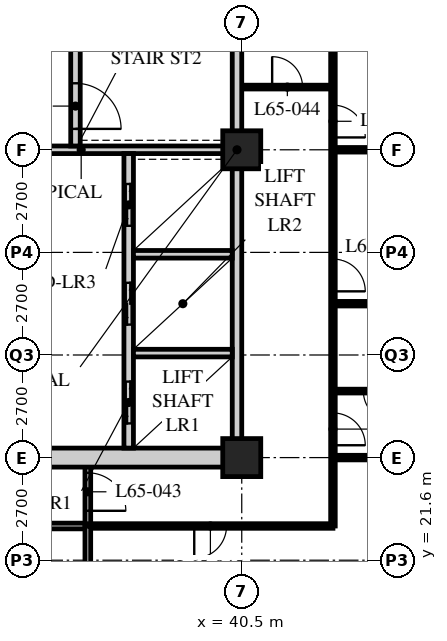
"""IFC4 building model, lengths in metres.
Left out: names, types, materials, properties, quantities, classifications, styles, units other than length and angle.
Written with IfcOpenShell. Run it as: python <this file> out.ifc"""

import sys

from ifc_helpers import new_model, si_unit, direction, frame, frame_2d, origin, origin_2d, place, context, subcontext, project, spatial, rectangle, hollow_rectangle, extrude, element, fill, save


model = new_model("IFC4")
c1 = context("Model", 3, precision=1e-05, world=origin(), true_north=direction((0.0, 1.0)))
c2 = subcontext(c1, "Body", "Model", "MODEL_VIEW")
j1 = project(units=[si_unit("LENGTHUNIT", "METRE"), si_unit("PLANEANGLEUNIT", "RADIAN")], contexts=[c1])
p1 = place(None, origin())
s1 = spatial("IfcSite", under=j1, at=p1, CompositionType="ELEMENT")
p2 = place(p1, origin())
s2 = spatial("IfcBuilding", under=s1, at=p2, CompositionType="ELEMENT")
p3 = place(p2, frame((0.0, 0.0, 254.1)))
s3 = spatial("IfcBuildingStorey", under=s2, at=p3, CompositionType="ELEMENT", Elevation=254.1)
for number, where, z_axis, x_axis in (
    (1, (40.5, 24.3, 0.0), (0.0, 0.0, 1.0), (1.0, 0.0, 0.0)),
    (2, (40.5, 32.4, 0.0), (0.0, 0.0, 1.0), (1.0, 0.0, 0.0)),
):
    element("IfcColumn", number, at=place(p3, frame(where, z_axis=z_axis, x_axis=x_axis)), inside=s3, PredefinedType="COLUMN", context=c2, shape_type="SweptSolid", body=[
        extrude(hollow_rectangle(XDim=1.0, YDim=1.0, WallThickness=0.1, at=origin_2d()), origin(), (0.0, 0.0, 1.0), 3.9),
    ])
p4 = place(p3, frame((12.15, 22.5, 0.0), z_axis=(0.0, 0.0, 1.0), x_axis=(1.0, 0.0, 0.0)))
e3 = element("IfcWall", 3, at=p4, inside=s3, PredefinedType="PARTITIONING", context=c2, shape_type="SweptSolid", body=[
    extrude(rectangle(XDim=24.3, YDim=0.15, at=frame_2d((12.15, 0.0))), origin(), (0.0, 0.0, 1.0), 3.69),
])
p5 = place(p4, frame((6.4, 0.0, 0.0)))
e4 = element("IfcOpeningElement", 4, at=p5, cuts=e3, PredefinedType="OPENING", context=c2, shape_type="SweptSolid", body=[
    extrude(rectangle(XDim=1.0, YDim=2.1, at=frame_2d((0.5, 1.05))), frame((0.0, 0.085, 0.0), z_axis=(0.0, -1.0, 0.0), x_axis=(1.0, 0.0, 0.0)), (0.0, 0.0, 1.0), 0.17),
])
p6 = place(p4, frame((8.5, 0.0, 0.0)))
e5 = element("IfcOpeningElement", 5, at=p6, cuts=e3, PredefinedType="OPENING", context=c2, shape_type="SweptSolid", body=[
    extrude(rectangle(XDim=1.0, YDim=2.1, at=frame_2d((0.5, 1.05))), frame((0.0, 0.085, 0.0), z_axis=(0.0, -1.0, 0.0), x_axis=(1.0, 0.0, 0.0)), (0.0, 0.0, 1.0), 0.17),
])
p7 = place(p4, frame((16.6, 0.0, 0.0)))
e6 = element("IfcOpeningElement", 6, at=p7, cuts=e3, PredefinedType="OPENING", context=c2, shape_type="SweptSolid", body=[
    extrude(rectangle(XDim=1.0, YDim=2.1, at=frame_2d((0.5, 1.05))), frame((0.0, 0.085, 0.0), z_axis=(0.0, -1.0, 0.0), x_axis=(1.0, 0.0, 0.0)), (0.0, 0.0, 1.0), 0.17),
])
p8 = place(p4, frame((2.625, 0.0, 0.0)))
e7 = element("IfcOpeningElement", 7, at=p8, cuts=e3, PredefinedType="OPENING", context=c2, shape_type="SweptSolid", body=[
    extrude(rectangle(XDim=1.0, YDim=2.1, at=frame_2d((0.5, 1.05))), frame((0.0, 0.085, 0.0), z_axis=(0.0, -1.0, 0.0), x_axis=(1.0, 0.0, 0.0)), (0.0, 0.0, 1.0), 0.17),
])
p9 = place(p3, frame((36.45, 22.5, 0.0), z_axis=(0.0, 0.0, 1.0), x_axis=(0.0, 1.0, 0.0)))
e8 = element("IfcWall", 8, at=p9, inside=s3, PredefinedType="PARTITIONING", context=c2, shape_type="SweptSolid", body=[
    extrude(rectangle(XDim=1.8, YDim=0.15, at=frame_2d((0.9, 0.0))), origin(), (0.0, 0.0, 1.0), 3.69),
])
p10 = place(p9, frame((0.4, 0.0, 0.0)))
e9 = element("IfcOpeningElement", 9, at=p10, cuts=e8, PredefinedType="OPENING", context=c2, shape_type="SweptSolid", body=[
    extrude(rectangle(XDim=1.0, YDim=2.1, at=frame_2d((0.5, 1.05))), frame((0.0, 0.085, 0.0), z_axis=(0.0, -1.0, 0.0), x_axis=(1.0, 0.0, 0.0)), (0.0, 0.0, 1.0), 0.17),
])
p11 = place(p3, frame((40.5, 34.05, 0.0), z_axis=(0.0, 0.0, 1.0), x_axis=(1.0, 0.0, 0.0)))
e10 = element("IfcWall", 10, at=p11, inside=s3, PredefinedType="PARTITIONING", context=c2, shape_type="SweptSolid", body=[
    extrude(rectangle(XDim=2.4, YDim=0.1, at=frame_2d((1.2, 0.0))), origin(), (0.0, 0.0, 1.0), 3.69),
])
p12 = place(p11, frame((0.8, 0.0, 0.0)))
e11 = element("IfcOpeningElement", 11, at=p12, cuts=e10, PredefinedType="OPENING", context=c2, shape_type="SweptSolid", body=[
    extrude(rectangle(XDim=0.8, YDim=2.1, at=frame_2d((0.4, 1.05))), frame((0.0, 0.06, 0.0), z_axis=(0.0, -1.0, 0.0), x_axis=(1.0, 0.0, 0.0)), (0.0, 0.0, 1.0), 0.12),
])
p13 = place(p3, frame((42.9, 22.5, 0.0), z_axis=(0.0, 0.0, 1.0), x_axis=(0.0, 1.0, 0.0)))
e12 = element("IfcWall", 12, at=p13, inside=s3, PredefinedType="PARTITIONING", context=c2, shape_type="SweptSolid", body=[
    extrude(rectangle(XDim=13.95, YDim=0.12, at=frame_2d((6.975, 0.0))), origin(), (0.0, 0.0, 1.0), 3.69),
])
p14 = place(p13, frame((2.125, 0.0, 0.0)))
e13 = element("IfcOpeningElement", 13, at=p14, cuts=e12, PredefinedType="OPENING", context=c2, shape_type="SweptSolid", body=[
    extrude(rectangle(XDim=0.85, YDim=2.1, at=frame_2d((0.425, 1.05))), frame((0.0, 0.07, 0.0), z_axis=(0.0, -1.0, 0.0), x_axis=(1.0, 0.0, 0.0)), (0.0, 0.0, 1.0), 0.14),
])
p15 = place(p13, frame((6.175, 0.0, 0.0)))
e14 = element("IfcOpeningElement", 14, at=p15, cuts=e12, PredefinedType="OPENING", context=c2, shape_type="SweptSolid", body=[
    extrude(rectangle(XDim=0.85, YDim=2.1, at=frame_2d((0.425, 1.05))), frame((0.0, 0.07, 0.0), z_axis=(0.0, -1.0, 0.0), x_axis=(1.0, 0.0, 0.0)), (0.0, 0.0, 1.0), 0.14),
])
p16 = place(p13, frame((10.225, 0.0, 0.0)))
e15 = element("IfcOpeningElement", 15, at=p16, cuts=e12, PredefinedType="OPENING", context=c2, shape_type="SweptSolid", body=[
    extrude(rectangle(XDim=0.85, YDim=2.1, at=frame_2d((0.425, 1.05))), frame((0.0, 0.07, 0.0), z_axis=(0.0, -1.0, 0.0), x_axis=(1.0, 0.0, 0.0)), (0.0, 0.0, 1.0), 0.14),
])
p17 = place(p3, frame((36.45, 22.5, 0.0), z_axis=(0.0, 0.0, 1.0), x_axis=(1.0, 0.0, 0.0)))
e16 = element("IfcWall", 16, at=p17, inside=s3, PredefinedType="PARTITIONING", context=c2, shape_type="SweptSolid", body=[
    extrude(rectangle(XDim=6.45, YDim=0.12, at=frame_2d((3.225, 0.0))), origin(), (0.0, 0.0, 1.0), 3.69),
])
p18 = place(p17, frame((2.8, 0.0, 0.0)))
e17 = element("IfcOpeningElement", 17, at=p18, cuts=e16, PredefinedType="OPENING", context=c2, shape_type="SweptSolid", body=[
    extrude(rectangle(XDim=0.85, YDim=2.1, at=frame_2d((0.425, 1.05))), frame((0.0, 0.07, 0.0), z_axis=(0.0, -1.0, 0.0), x_axis=(1.0, 0.0, 0.0)), (0.0, 0.0, 1.0), 0.14),
])
p19 = place(p3, frame((42.9, 24.3, 0.0), z_axis=(0.0, 0.0, 1.0), x_axis=(1.0, 0.0, 0.0)))
e18 = element("IfcWall", 18, at=p19, inside=s3, PredefinedType="PARTITIONING", context=c2, shape_type="SweptSolid", body=[
    extrude(rectangle(XDim=9.45, YDim=0.12, at=frame_2d((4.725, 0.0))), origin(), (0.0, 0.0, 1.0), 3.078),
])
p20 = place(p3, frame((36.45, 16.5, 0.0), z_axis=(0.0, 0.0, 1.0), x_axis=(0.0, 1.0, 0.0)))
e19 = element("IfcWall", 19, at=p20, inside=s3, PredefinedType="PARTITIONING", context=c2, shape_type="SweptSolid", body=[
    extrude(rectangle(XDim=6.0, YDim=0.15, at=frame_2d((3.0, 0.0))), origin(), (0.0, 0.0, 1.0), 3.69),
])
p21 = place(p3, frame((42.9, 26.05, 0.0), z_axis=(0.0, 0.0, 1.0), x_axis=(1.0, 0.0, 0.0)))
e20 = element("IfcWall", 20, at=p21, inside=s3, PredefinedType="PARTITIONING", context=c2, shape_type="SweptSolid", body=[
    extrude(rectangle(XDim=2.4, YDim=0.1, at=frame_2d((1.2, 0.0))), origin(), (0.0, 0.0, 1.0), 3.69),
])
p22 = place(p21, frame((0.8, 0.0, 0.0)))
e21 = element("IfcOpeningElement", 21, at=p22, cuts=e20, PredefinedType="OPENING", context=c2, shape_type="SweptSolid", body=[
    extrude(rectangle(XDim=0.8, YDim=2.1, at=frame_2d((0.4, 1.05))), frame((0.0, 0.06, 0.0), z_axis=(0.0, -1.0, 0.0), x_axis=(1.0, 0.0, 0.0)), (0.0, 0.0, 1.0), 0.12),
])
p23 = place(p3, frame((42.9, 28.35, 0.0), z_axis=(0.0, 0.0, 1.0), x_axis=(1.0, 0.0, 0.0)))
e22 = element("IfcWall", 22, at=p23, inside=s3, PredefinedType="PARTITIONING", context=c2, shape_type="SweptSolid", body=[
    extrude(rectangle(XDim=13.5, YDim=0.12, at=frame_2d((6.75, 0.0))), origin(), (0.0, 0.0, 1.0), 3.69),
])
p24 = place(p3, frame((42.9, 32.4, 0.0), z_axis=(0.0, 0.0, 1.0), x_axis=(1.0, 0.0, 0.0)))
e23 = element("IfcWall", 23, at=p24, inside=s3, PredefinedType="PARTITIONING", context=c2, shape_type="SweptSolid", body=[
    extrude(rectangle(XDim=13.5, YDim=0.12, at=frame_2d((6.75, 0.0))), origin(), (0.0, 0.0, 1.0), 3.078),
])
p25 = place(p3, frame((15.95, 24.3, 0.0), z_axis=(0.0, 0.0, 1.0), x_axis=(1.0, 0.0, 0.0)))
e24 = element("IfcWall", 24, at=p25, inside=s3, PredefinedType="SOLIDWALL", context=c2, shape_type="SweptSolid", body=[
    extrude(rectangle(XDim=24.55, YDim=0.5, at=frame_2d((12.275, 0.0))), origin(), (0.0, 0.0, 1.0), 3.04),
])
p26 = place(p25, frame((11.5, 0.0, 0.0)))
e25 = element("IfcOpeningElement", 25, at=p26, cuts=e24, PredefinedType="OPENING", context=c2, shape_type="SweptSolid", body=[
    extrude(rectangle(XDim=1.8, YDim=2.4, at=frame_2d((0.9, 1.2))), frame((0.0, 0.26, 0.0), z_axis=(0.0, -1.0, 0.0), x_axis=(1.0, 0.0, 0.0)), (0.0, 0.0, 1.0), 0.52),
])
p27 = place(p3, frame((40.375, 24.55, 0.0), z_axis=(0.0, 0.0, 1.0), x_axis=(0.0, 1.0, 0.0)))
e26 = element("IfcWall", 26, at=p27, inside=s3, PredefinedType="SOLIDWALL", context=c2, shape_type="SweptSolid", body=[
    extrude(rectangle(XDim=15.7, YDim=0.25, at=frame_2d((7.85, 0.0))), origin(), (0.0, 0.0, 1.0), 3.078),
])
p28 = place(p3, frame((32.3, 32.4, 0.0), z_axis=(0.0, 0.0, 1.0), x_axis=(1.0, 0.0, 0.0)))
e27 = element("IfcWall", 27, at=p28, inside=s3, PredefinedType="SOLIDWALL", context=c2, shape_type="SweptSolid", body=[
    extrude(rectangle(XDim=7.95, YDim=0.2, at=frame_2d((3.975, 0.0))), origin(), (0.0, 0.0, 1.0), 3.078),
])
p29 = place(p3, frame((37.525, 24.55, 0.0), z_axis=(0.0, 0.0, 1.0), x_axis=(0.0, 1.0, 0.0)))
e28 = element("IfcWall", 28, at=p29, inside=s3, PredefinedType="SOLIDWALL", context=c2, shape_type="SweptSolid", body=[
    extrude(rectangle(XDim=7.75, YDim=0.25, at=frame_2d((3.875, 0.0))), origin(), (0.0, 0.0, 1.0), 3.69),
])
p30 = place(p29, frame((0.65, 0.0, 0.0)))
e29 = element("IfcOpeningElement", 29, at=p30, cuts=e28, PredefinedType="OPENING", context=c2, shape_type="SweptSolid", body=[
    extrude(rectangle(XDim=1.1, YDim=2.4, at=frame_2d((0.55, 1.2))), frame((0.0, 0.135, 0.0), z_axis=(0.0, -1.0, 0.0), x_axis=(1.0, 0.0, 0.0)), (0.0, 0.0, 1.0), 0.27),
])
p31 = place(p29, frame((3.25, 0.0, 0.0)))
e30 = element("IfcOpeningElement", 30, at=p31, cuts=e28, PredefinedType="OPENING", context=c2, shape_type="SweptSolid", body=[
    extrude(rectangle(XDim=1.1, YDim=2.4, at=frame_2d((0.55, 1.2))), frame((0.0, 0.135, 0.0), z_axis=(0.0, -1.0, 0.0), x_axis=(1.0, 0.0, 0.0)), (0.0, 0.0, 1.0), 0.27),
])
p32 = place(p29, frame((5.85, 0.0, 0.0)))
e31 = element("IfcOpeningElement", 31, at=p32, cuts=e28, PredefinedType="OPENING", context=c2, shape_type="SweptSolid", body=[
    extrude(rectangle(XDim=1.1, YDim=2.4, at=frame_2d((0.55, 1.2))), frame((0.0, 0.135, 0.0), z_axis=(0.0, -1.0, 0.0), x_axis=(1.0, 0.0, 0.0)), (0.0, 0.0, 1.0), 0.27),
])
for number, where, z_axis, x_axis in (
    (32, (37.65, 27.05, 0.0), (0.0, 0.0, 1.0), (1.0, 0.0, 0.0)),
    (33, (37.65, 29.65, 0.0), (0.0, 0.0, 1.0), (1.0, 0.0, 0.0)),
):
    element("IfcWall", number, at=place(p3, frame(where, z_axis=z_axis, x_axis=x_axis)), inside=s3, PredefinedType="SOLIDWALL", context=c2, shape_type="SweptSolid", body=[
        extrude(rectangle(XDim=2.6, YDim=0.2, at=frame_2d((1.3, 0.0))), origin(), (0.0, 0.0, 1.0), 3.69),
    ])
p33 = place(p3, frame((36.125, 32.5, 0.0), z_axis=(0.0, 0.0, 1.0), x_axis=(0.0, 1.0, 0.0)))
e34 = element("IfcWall", 34, at=p33, inside=s3, PredefinedType="SOLIDWALL", context=c2, shape_type="SweptSolid", body=[
    extrude(rectangle(XDim=7.75, YDim=0.25, at=frame_2d((3.875, 0.0))), origin(), (0.0, 0.0, 1.0), 3.69),
])
p34 = place(p33, frame((0.45, 0.0, 0.0)))
e35 = element("IfcOpeningElement", 35, at=p34, cuts=e34, PredefinedType="OPENING", context=c2, shape_type="SweptSolid", body=[
    extrude(rectangle(XDim=1.2, YDim=2.1, at=frame_2d((0.6, 1.05))), frame((0.0, 0.135, 0.0), z_axis=(0.0, -1.0, 0.0), x_axis=(1.0, 0.0, 0.0)), (0.0, 0.0, 1.0), 0.27),
])
p35 = place(p10, origin())
e36 = element("IfcDoor", 36, at=p35, inside=s3, OperationType="SINGLE_SWING_RIGHT", PredefinedType="DOOR", context=c2, shape_type="SweptSolid", body=[
    extrude(rectangle(XDim=1.0, YDim=2.1, at=frame_2d((0.5, 1.05))), frame((0.0, 0.025, 0.0), z_axis=(0.0, -1.0, 0.0), x_axis=(1.0, 0.0, 0.0)), (0.0, 0.0, 1.0), 0.05),
])
fill(e9, e36)
p36 = place(p12, origin())
e37 = element("IfcDoor", 37, at=p36, inside=s3, OperationType="SINGLE_SWING_LEFT", PredefinedType="DOOR", context=c2, shape_type="SweptSolid", body=[
    extrude(rectangle(XDim=0.8, YDim=2.1, at=frame_2d((0.4, 1.05))), frame((0.0, 0.025, 0.0), z_axis=(0.0, -1.0, 0.0), x_axis=(1.0, 0.0, 0.0)), (0.0, 0.0, 1.0), 0.05),
])
fill(e11, e37)
p37 = place(p18, origin())
e38 = element("IfcDoor", 38, at=p37, inside=s3, OperationType="SINGLE_SWING_RIGHT", PredefinedType="DOOR", context=c2, shape_type="SweptSolid", body=[
    extrude(rectangle(XDim=0.85, YDim=2.1, at=frame_2d((0.425, 1.05))), frame((0.0, 0.025, 0.0), z_axis=(0.0, -1.0, 0.0), x_axis=(1.0, 0.0, 0.0)), (0.0, 0.0, 1.0), 0.05),
])
fill(e17, e38)
p38 = place(p22, origin())
e39 = element("IfcDoor", 39, at=p38, inside=s3, OperationType="SINGLE_SWING_LEFT", PredefinedType="DOOR", context=c2, shape_type="SweptSolid", body=[
    extrude(rectangle(XDim=0.8, YDim=2.1, at=frame_2d((0.4, 1.05))), frame((0.0, 0.025, 0.0), z_axis=(0.0, -1.0, 0.0), x_axis=(1.0, 0.0, 0.0)), (0.0, 0.0, 1.0), 0.05),
])
fill(e21, e39)
p39 = place(p14, origin())
e40 = element("IfcDoor", 40, at=p39, inside=s3, OperationType="SINGLE_SWING_RIGHT", PredefinedType="DOOR", context=c2, shape_type="SweptSolid", body=[
    extrude(rectangle(XDim=0.85, YDim=2.1, at=frame_2d((0.425, 1.05))), frame((0.0, 0.025, 0.0), z_axis=(0.0, -1.0, 0.0), x_axis=(1.0, 0.0, 0.0)), (0.0, 0.0, 1.0), 0.05),
])
fill(e13, e40)
p40 = place(p15, origin())
e41 = element("IfcDoor", 41, at=p40, inside=s3, OperationType="SINGLE_SWING_RIGHT", PredefinedType="DOOR", context=c2, shape_type="SweptSolid", body=[
    extrude(rectangle(XDim=0.85, YDim=2.1, at=frame_2d((0.425, 1.05))), frame((0.0, 0.025, 0.0), z_axis=(0.0, -1.0, 0.0), x_axis=(1.0, 0.0, 0.0)), (0.0, 0.0, 1.0), 0.05),
])
fill(e14, e41)
p41 = place(p16, origin())
e42 = element("IfcDoor", 42, at=p41, inside=s3, OperationType="SINGLE_SWING_RIGHT", PredefinedType="DOOR", context=c2, shape_type="SweptSolid", body=[
    extrude(rectangle(XDim=0.85, YDim=2.1, at=frame_2d((0.425, 1.05))), frame((0.0, 0.025, 0.0), z_axis=(0.0, -1.0, 0.0), x_axis=(1.0, 0.0, 0.0)), (0.0, 0.0, 1.0), 0.05),
])
fill(e15, e42)
p42 = place(p34, origin())
e43 = element("IfcDoor", 43, at=p42, inside=s3, OperationType="SINGLE_SWING_RIGHT", PredefinedType="DOOR", context=c2, shape_type="SweptSolid", body=[
    extrude(rectangle(XDim=1.2, YDim=2.1, at=frame_2d((0.6, 1.05))), frame((0.0, 0.025, 0.0), z_axis=(0.0, -1.0, 0.0), x_axis=(1.0, 0.0, 0.0)), (0.0, 0.0, 1.0), 0.05),
])
fill(e35, e43)
p43 = place(p30, origin())
e44 = element("IfcDoor", 44, at=p43, inside=s3, OperationType="DOUBLE_DOOR_SLIDING", PredefinedType="DOOR", context=c2, shape_type="SweptSolid", body=[
    extrude(rectangle(XDim=1.1, YDim=2.4, at=frame_2d((0.55, 1.2))), frame((0.0, 0.025, 0.0), z_axis=(0.0, -1.0, 0.0), x_axis=(1.0, 0.0, 0.0)), (0.0, 0.0, 1.0), 0.05),
])
fill(e29, e44)
p44 = place(p31, origin())
e45 = element("IfcDoor", 45, at=p44, inside=s3, OperationType="DOUBLE_DOOR_SLIDING", PredefinedType="DOOR", context=c2, shape_type="SweptSolid", body=[
    extrude(rectangle(XDim=1.1, YDim=2.4, at=frame_2d((0.55, 1.2))), frame((0.0, 0.025, 0.0), z_axis=(0.0, -1.0, 0.0), x_axis=(1.0, 0.0, 0.0)), (0.0, 0.0, 1.0), 0.05),
])
fill(e30, e45)
p45 = place(p32, origin())
e46 = element("IfcDoor", 46, at=p45, inside=s3, OperationType="DOUBLE_DOOR_SLIDING", PredefinedType="DOOR", context=c2, shape_type="SweptSolid", body=[
    extrude(rectangle(XDim=1.1, YDim=2.4, at=frame_2d((0.55, 1.2))), frame((0.0, 0.025, 0.0), z_axis=(0.0, -1.0, 0.0), x_axis=(1.0, 0.0, 0.0)), (0.0, 0.0, 1.0), 0.05),
])
fill(e31, e46)
save(model, sys.argv[1])
